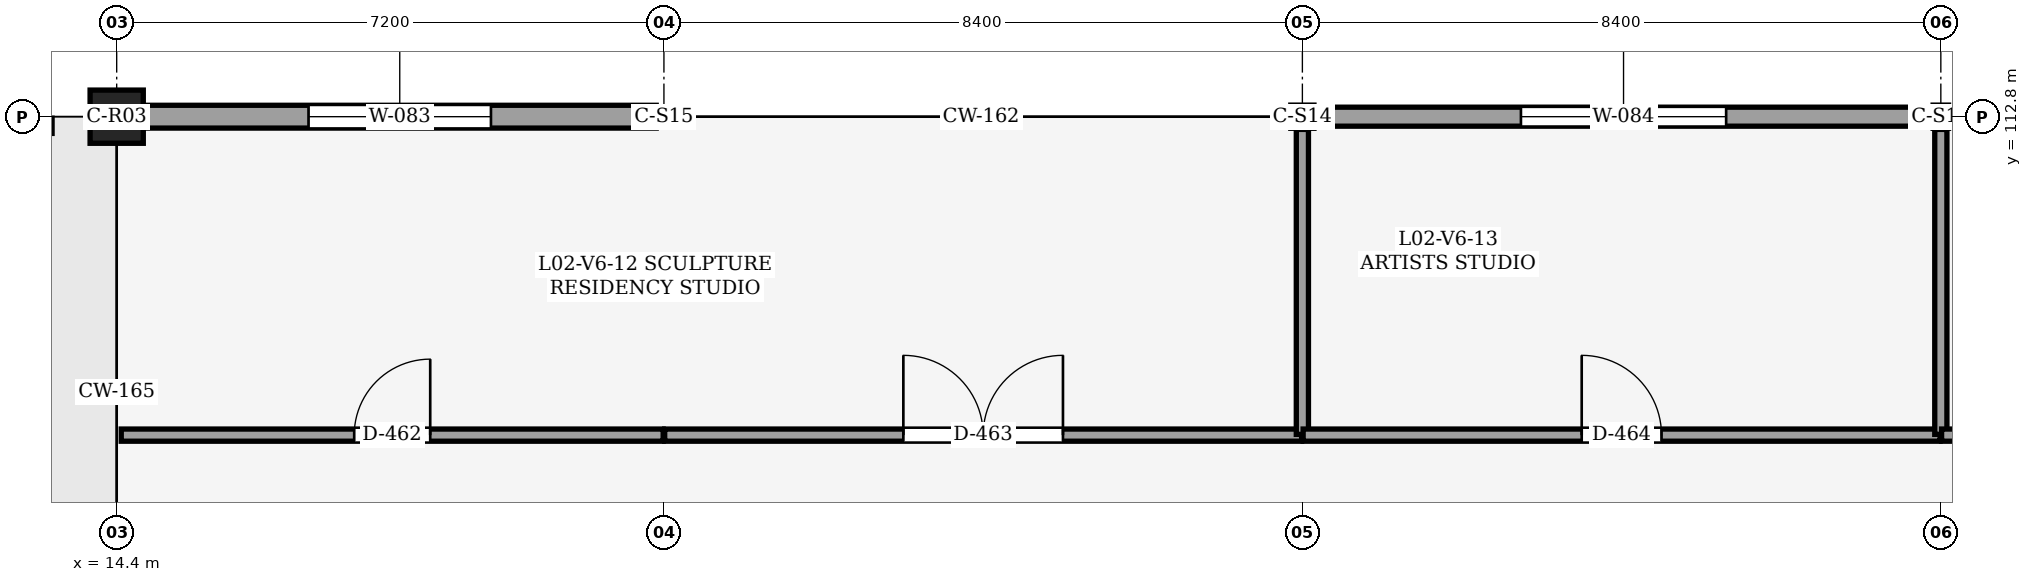
"""IFC4 building model, lengths in metres.
Left out: names, types, materials, properties, quantities, classifications, styles, units other than length and angle.
Written with IfcOpenShell. Run it as: python <this file> out.ifc"""

import sys

from ifc_helpers import new_model, si_unit, direction, frame, frame_2d, origin, origin_2d, place, context, subcontext, project, spatial, rectangle, hollow_rectangle, extrude, element, fill, save


model = new_model("IFC4")
c1 = context("Model", 3, precision=1e-05, world=origin(), true_north=direction((0.0, 1.0)))
c2 = subcontext(c1, "Body", "Model", "MODEL_VIEW")
j1 = project(units=[si_unit("LENGTHUNIT", "METRE"), si_unit("PLANEANGLEUNIT", "RADIAN")], contexts=[c1])
p1 = place(None, origin())
s1 = spatial("IfcSite", under=j1, at=p1, CompositionType="ELEMENT")
p2 = place(p1, origin())
s2 = spatial("IfcBuilding", under=s1, at=p2, CompositionType="ELEMENT")
p3 = place(p2, frame((0.0, 0.0, 10.2)))
s3 = spatial("IfcBuildingStorey", under=s2, at=p3, CompositionType="ELEMENT", Elevation=10.2)
p4 = place(p3, frame((14.4, 112.8, 0.0), z_axis=(0.0, 0.0, 1.0), x_axis=(1.0, 0.0, 0.0)))
e1 = element("IfcColumn", 1, at=p4, inside=s3, PredefinedType="COLUMN", context=c2, shape_type="SweptSolid", body=[
    extrude(rectangle(XDim=0.7, YDim=0.7, at=origin_2d()), origin(), (0.0, 0.0, 1.0), 4.8),
])
p5 = place(p3, frame((21.6, 112.8, 0.0), z_axis=(0.0, 0.0, 1.0), x_axis=(1.0, 0.0, 0.0)))
e2 = element("IfcColumn", 2, at=p5, inside=s3, PredefinedType="COLUMN", context=c2, shape_type="SweptSolid", body=[
    extrude(hollow_rectangle(XDim=0.203, YDim=0.203, WallThickness=0.013, OuterFilletRadius=0.025, at=origin_2d()), origin(), (0.0, 0.0, 1.0), 4.8),
])
p6 = place(p3, frame((30.0, 112.8, 0.0), z_axis=(0.0, 0.0, 1.0), x_axis=(1.0, 0.0, 0.0)))
e3 = element("IfcColumn", 3, at=p6, inside=s3, PredefinedType="COLUMN", context=c2, shape_type="SweptSolid", body=[
    extrude(hollow_rectangle(XDim=0.305, YDim=0.305, WallThickness=0.016, OuterFilletRadius=0.032, at=origin_2d()), origin(), (0.0, 0.0, 1.0), 4.8),
])
p7 = place(p3, frame((38.4, 112.8, 0.0), z_axis=(0.0, 0.0, 1.0), x_axis=(1.0, 0.0, 0.0)))
e4 = element("IfcColumn", 4, at=p7, inside=s3, PredefinedType="COLUMN", context=c2, shape_type="SweptSolid", body=[
    extrude(hollow_rectangle(XDim=0.203, YDim=0.305, WallThickness=0.013, OuterFilletRadius=0.025, at=origin_2d()), origin(), (0.0, 0.0, 1.0), 4.8),
])
p8 = place(p3, frame((14.75, 112.8, 0.0), z_axis=(0.0, 0.0, 1.0), x_axis=(1.0, 0.0, 0.0)))
e5 = element("IfcWall", 5, at=p8, inside=s3, PredefinedType="SOLIDWALL", context=c2, shape_type="SweptSolid", body=[
    extrude(rectangle(XDim=6.748, YDim=0.3, at=frame_2d((3.374, 0.0))), origin(), (0.0, 0.0, 1.0), 4.56),
])
p9 = place(p8, frame((2.174, 0.0, 0.9)))
e6 = element("IfcOpeningElement", 6, at=p9, cuts=e5, PredefinedType="OPENING", context=c2, shape_type="SweptSolid", body=[
    extrude(rectangle(XDim=2.4, YDim=1.75, at=frame_2d((1.2, 0.875))), frame((0.0, 0.16, 0.0), z_axis=(0.0, -1.0, 0.0), x_axis=(1.0, 0.0, 0.0)), (0.0, 0.0, 1.0), 0.321),
])
p10 = place(p3, frame((30.152, 112.8, 0.0), z_axis=(0.0, 0.0, 1.0), x_axis=(1.0, 0.0, 0.0)))
e7 = element("IfcWall", 7, at=p10, inside=s3, PredefinedType="SOLIDWALL", context=c2, shape_type="SweptSolid", body=[
    extrude(rectangle(XDim=8.146, YDim=0.25, at=frame_2d((4.073, 0.0))), origin(), (0.0, 0.0, 1.0), 4.56),
])
p11 = place(p10, frame((2.723, 0.0, 0.9)))
e8 = element("IfcOpeningElement", 8, at=p11, cuts=e7, PredefinedType="OPENING", context=c2, shape_type="SweptSolid", body=[
    extrude(rectangle(XDim=2.7, YDim=1.75, at=frame_2d((1.35, 0.875))), frame((0.0, 0.135, 0.0), z_axis=(0.0, -1.0, 0.0), x_axis=(1.0, 0.0, 0.0)), (0.0, 0.0, 1.0), 0.271),
])
p12 = place(p3, frame((14.46, 108.61, 0.0), z_axis=(0.0, 0.0, 1.0), x_axis=(1.0, 0.0, 0.0)))
e9 = element("IfcWall", 9, at=p12, inside=s3, PredefinedType="PARTITIONING", context=c2, shape_type="SweptSolid", body=[
    extrude(rectangle(XDim=7.13, YDim=0.16, at=frame_2d((3.565, 0.0))), origin(), (0.0, 0.0, 1.0), 4.54),
])
p13 = place(p12, frame((3.065, 0.0, 0.0)))
e10 = element("IfcOpeningElement", 10, at=p13, cuts=e9, PredefinedType="OPENING", context=c2, shape_type="SweptSolid", body=[
    extrude(rectangle(XDim=1.0, YDim=2.15, at=frame_2d((0.5, 1.075))), frame((0.0, 0.09, 0.0), z_axis=(0.0, -1.0, 0.0), x_axis=(1.0, 0.0, 0.0)), (0.0, 0.0, 1.0), 0.18),
])
p14 = place(p3, frame((21.61, 108.61, 0.0), z_axis=(0.0, 0.0, 1.0), x_axis=(1.0, 0.0, 0.0)))
e11 = element("IfcWall", 11, at=p14, inside=s3, PredefinedType="PARTITIONING", context=c2, shape_type="SweptSolid", body=[
    extrude(rectangle(XDim=8.38, YDim=0.16, at=frame_2d((4.19, 0.0))), origin(), (0.0, 0.0, 1.0), 4.54),
])
p15 = place(p14, frame((3.14, 0.0, 0.0)))
e12 = element("IfcOpeningElement", 12, at=p15, cuts=e11, PredefinedType="OPENING", context=c2, shape_type="SweptSolid", body=[
    extrude(rectangle(XDim=2.1, YDim=2.5, at=frame_2d((1.05, 1.25))), frame((0.0, 0.09, 0.0), z_axis=(0.0, -1.0, 0.0), x_axis=(1.0, 0.0, 0.0)), (0.0, 0.0, 1.0), 0.18),
])
p16 = place(p3, frame((30.0, 108.62, 0.0), z_axis=(0.0, 0.0, 1.0), x_axis=(0.0, 1.0, 0.0)))
e13 = element("IfcWall", 13, at=p16, inside=s3, PredefinedType="PARTITIONING", context=c2, shape_type="SweptSolid", body=[
    extrude(rectangle(XDim=4.012, YDim=0.16, at=frame_2d((2.006, 0.0))), origin(), (0.0, 0.0, 1.0), 4.54),
])
p17 = place(p3, frame((30.01, 108.61, 0.0), z_axis=(0.0, 0.0, 1.0), x_axis=(1.0, 0.0, 0.0)))
e14 = element("IfcWall", 14, at=p17, inside=s3, PredefinedType="PARTITIONING", context=c2, shape_type="SweptSolid", body=[
    extrude(rectangle(XDim=8.38, YDim=0.16, at=frame_2d((4.19, 0.0))), origin(), (0.0, 0.0, 1.0), 4.54),
])
p18 = place(p17, frame((3.665, 0.0, 0.0)))
e15 = element("IfcOpeningElement", 15, at=p18, cuts=e14, PredefinedType="OPENING", context=c2, shape_type="SweptSolid", body=[
    extrude(rectangle(XDim=1.05, YDim=2.15, at=frame_2d((0.525, 1.075))), frame((0.0, 0.09, 0.0), z_axis=(0.0, -1.0, 0.0), x_axis=(1.0, 0.0, 0.0)), (0.0, 0.0, 1.0), 0.18),
])
p19 = place(p3, frame((38.4, 108.62, 0.0), z_axis=(0.0, 0.0, 1.0), x_axis=(0.0, 1.0, 0.0)))
e16 = element("IfcWall", 16, at=p19, inside=s3, PredefinedType="PARTITIONING", context=c2, shape_type="SweptSolid", body=[
    extrude(rectangle(XDim=4.012, YDim=0.16, at=frame_2d((2.006, 0.0))), origin(), (0.0, 0.0, 1.0), 4.54),
])
p20 = place(p3, frame((38.41, 108.61, 0.0), z_axis=(0.0, 0.0, 1.0), x_axis=(1.0, 0.0, 0.0)))
e17 = element("IfcWall", 17, at=p20, inside=s3, PredefinedType="PARTITIONING", context=c2, shape_type="SweptSolid", body=[
    extrude(rectangle(XDim=8.38, YDim=0.16, at=frame_2d((4.19, 0.0))), origin(), (0.0, 0.0, 1.0), 4.54),
])
p21 = place(p20, frame((3.59, 0.0, 0.0)))
e18 = element("IfcOpeningElement", 18, at=p21, cuts=e17, PredefinedType="OPENING", context=c2, shape_type="SweptSolid", body=[
    extrude(rectangle(XDim=1.2, YDim=2.2, at=frame_2d((0.6, 1.1))), frame((0.0, 0.09, 0.0), z_axis=(0.0, -1.0, 0.0), x_axis=(1.0, 0.0, 0.0)), (0.0, 0.0, 1.0), 0.18),
])
p22 = place(p9, origin())
e19 = element("IfcWindow", 19, at=p22, inside=s3, PartitioningType="SINGLE_PANEL", PredefinedType="WINDOW", context=c2, shape_type="SweptSolid", body=[
    extrude(rectangle(XDim=2.4, YDim=1.75, at=frame_2d((1.2, 0.875))), frame((0.0, 0.03, 0.0), z_axis=(0.0, -1.0, 0.0), x_axis=(1.0, 0.0, 0.0)), (0.0, 0.0, 1.0), 0.06),
])
fill(e6, e19)
p23 = place(p11, origin())
e20 = element("IfcWindow", 20, at=p23, inside=s3, PartitioningType="SINGLE_PANEL", PredefinedType="WINDOW", context=c2, shape_type="SweptSolid", body=[
    extrude(rectangle(XDim=2.7, YDim=1.75, at=frame_2d((1.35, 0.875))), frame((0.0, 0.03, 0.0), z_axis=(0.0, -1.0, 0.0), x_axis=(1.0, 0.0, 0.0)), (0.0, 0.0, 1.0), 0.06),
])
fill(e8, e20)
p24 = place(p13, origin())
e21 = element("IfcDoor", 21, at=p24, inside=s3, OperationType="SINGLE_SWING_RIGHT", PredefinedType="DOOR", context=c2, shape_type="SweptSolid", body=[
    extrude(rectangle(XDim=1.0, YDim=2.15, at=frame_2d((0.5, 1.075))), frame((0.0, 0.025, 0.0), z_axis=(0.0, -1.0, 0.0), x_axis=(1.0, 0.0, 0.0)), (0.0, 0.0, 1.0), 0.05),
])
fill(e10, e21)
p25 = place(p15, origin())
e22 = element("IfcDoor", 22, at=p25, inside=s3, OperationType="DOUBLE_DOOR_SINGLE_SWING", PredefinedType="DOOR", context=c2, shape_type="SweptSolid", body=[
    extrude(rectangle(XDim=2.1, YDim=2.5, at=frame_2d((1.05, 1.25))), frame((0.0, 0.025, 0.0), z_axis=(0.0, -1.0, 0.0), x_axis=(1.0, 0.0, 0.0)), (0.0, 0.0, 1.0), 0.05),
])
fill(e12, e22)
p26 = place(p18, origin())
e23 = element("IfcDoor", 23, at=p26, inside=s3, OperationType="SINGLE_SWING_LEFT", PredefinedType="DOOR", context=c2, shape_type="SweptSolid", body=[
    extrude(rectangle(XDim=1.05, YDim=2.15, at=frame_2d((0.525, 1.075))), frame((0.0, 0.025, 0.0), z_axis=(0.0, -1.0, 0.0), x_axis=(1.0, 0.0, 0.0)), (0.0, 0.0, 1.0), 0.05),
])
fill(e15, e23)
save(model, sys.argv[1])
